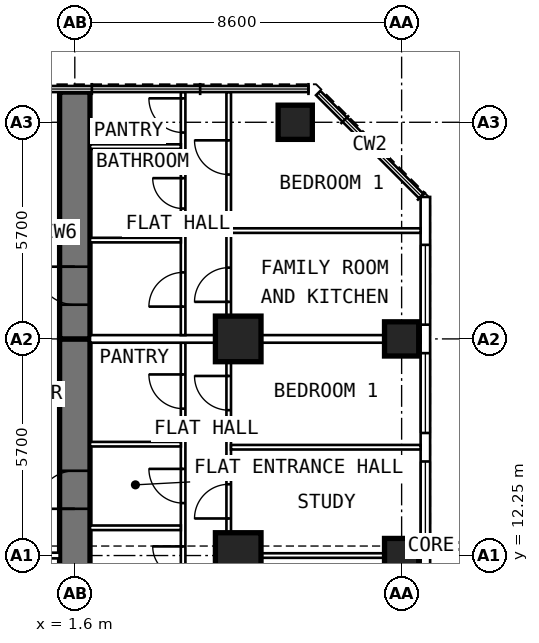
"""IFC4 building model, lengths in metres.
Left out: names, types, materials, properties, quantities, classifications, styles, units other than length and angle.
Written with IfcOpenShell. Run it as: python <this file> out.ifc"""

import sys

from ifc_helpers import new_model, si_unit, direction, frame, frame_2d, origin, origin_2d, place, context, subcontext, project, spatial, rectangle, extrude, element, fill, save


model = new_model("IFC4")
c1 = context("Model", 3, precision=1e-05, world=origin(), true_north=direction((0.0, 1.0)))
c2 = subcontext(c1, "Body", "Model", "MODEL_VIEW")
j1 = project(units=[si_unit("LENGTHUNIT", "METRE"), si_unit("PLANEANGLEUNIT", "RADIAN")], contexts=[c1])
p1 = place(None, origin())
s1 = spatial("IfcSite", under=j1, at=p1, CompositionType="ELEMENT")
p2 = place(p1, origin())
s2 = spatial("IfcBuilding", under=s1, at=p2, CompositionType="ELEMENT")
p3 = place(p2, frame((0.0, 0.0, 176.0)))
s3 = spatial("IfcBuildingStorey", under=s2, at=p3, CompositionType="ELEMENT", Elevation=176.0)
for number, where, z_axis, x_axis in (
    (1, (10.2, 12.25, 0.0), (0.0, 0.0, 1.0), (0.0, 1.0, 0.0)),
    (2, (10.2, 17.95, 0.0), (0.0, 0.0, 1.0), (0.0, 1.0, 0.0)),
    (3, (7.4, 23.65, 0.0), (0.0, 0.0, 1.0), (0.0, 1.0, 0.0)),
):
    element("IfcColumn", number, at=place(p3, frame(where, z_axis=z_axis, x_axis=x_axis)), inside=s3, PredefinedType="COLUMN", context=c2, shape_type="SweptSolid", body=[
        extrude(rectangle(XDim=0.9, YDim=0.9, at=origin_2d()), origin(), (0.0, 0.0, 1.0), 3.6),
    ])
for number, where, z_axis, x_axis in (
    (4, (5.9, 12.25, 0.0), (0.0, 0.0, 1.0), (0.0, 1.0, 0.0)),
    (5, (5.9, 17.95, 0.0), (0.0, 0.0, 1.0), (0.0, 1.0, 0.0)),
):
    element("IfcColumn", number, at=place(p3, frame(where, z_axis=z_axis, x_axis=x_axis)), inside=s3, PredefinedType="COLUMN", context=c2, shape_type="SweptSolid", body=[
        extrude(rectangle(XDim=1.2, YDim=1.2, at=origin_2d()), origin(), (0.0, 0.0, 1.0), 3.6),
    ])
p4 = place(p3, frame((1.6, 9.6, 0.0), z_axis=(0.0, 0.0, 1.0), x_axis=(0.0, 1.0, 0.0)))
e6 = element("IfcWall", 6, at=p4, inside=s3, PredefinedType="SHEAR", context=c2, shape_type="SweptSolid", body=[
    extrude(rectangle(XDim=8.35, YDim=0.8, at=frame_2d((4.175, 0.0))), origin(), (0.0, 0.0, 1.0), 3.6),
])
p5 = place(p4, frame((3.88, 0.0, 0.0)))
e7 = element("IfcOpeningElement", 7, at=p5, cuts=e6, PredefinedType="OPENING", context=c2, shape_type="SweptSolid", body=[
    extrude(rectangle(XDim=1.0, YDim=2.1, at=frame_2d((0.5, 1.05))), frame((0.0, 0.412, 0.0), z_axis=(0.0, -1.0, 0.0), x_axis=(1.0, 0.0, 0.0)), (0.0, 0.0, 1.0), 0.824),
])
p6 = place(p3, frame((1.6, 17.95, 0.0), z_axis=(0.0, 0.0, 1.0), x_axis=(0.0, 1.0, 0.0)))
e8 = element("IfcWall", 8, at=p6, inside=s3, PredefinedType="SHEAR", context=c2, shape_type="SweptSolid", body=[
    extrude(rectangle(XDim=6.495, YDim=0.8, at=frame_2d((3.248, 0.0))), origin(), (0.0, 0.0, 1.0), 3.6),
])
p7 = place(p6, frame((0.9, 0.0, 0.0)))
e9 = element("IfcOpeningElement", 9, at=p7, cuts=e8, PredefinedType="OPENING", context=c2, shape_type="SweptSolid", body=[
    extrude(rectangle(XDim=1.0, YDim=2.1, at=frame_2d((0.5, 1.05))), frame((0.0, 0.412, 0.0), z_axis=(0.0, -1.0, 0.0), x_axis=(1.0, 0.0, 0.0)), (0.0, 0.0, 1.0), 0.824),
])
p8 = place(p3, frame((10.825, 6.409, 0.0), z_axis=(0.0, 0.0, 1.0), x_axis=(0.0, 1.0, 0.0)))
e10 = element("IfcWall", 10, at=p8, inside=s3, PredefinedType="SOLIDWALL", context=c2, shape_type="SweptSolid", body=[
    extrude(rectangle(XDim=15.276, YDim=0.25, at=frame_2d((7.638, 0.0))), origin(), (0.0, 0.0, 1.0), 3.35),
])
p9 = place(p8, frame((0.516, 0.0, 0.8)))
e11 = element("IfcOpeningElement", 11, at=p9, cuts=e10, PredefinedType="OPENING", context=c2, shape_type="SweptSolid", body=[
    extrude(rectangle(XDim=2.1, YDim=1.8, at=frame_2d((1.05, 0.9))), frame((0.0, 0.137, 0.0), z_axis=(0.0, -1.0, 0.0), x_axis=(1.0, 0.0, 0.0)), (0.0, 0.0, 1.0), 0.274),
])
p10 = place(p8, frame((3.366, 0.0, 0.8)))
e12 = element("IfcOpeningElement", 12, at=p10, cuts=e10, PredefinedType="OPENING", context=c2, shape_type="SweptSolid", body=[
    extrude(rectangle(XDim=2.1, YDim=1.8, at=frame_2d((1.05, 0.9))), frame((0.0, 0.137, 0.0), z_axis=(0.0, -1.0, 0.0), x_axis=(1.0, 0.0, 0.0)), (0.0, 0.0, 1.0), 0.274),
])
p11 = place(p8, frame((6.216, 0.0, 0.8)))
e13 = element("IfcOpeningElement", 13, at=p11, cuts=e10, PredefinedType="OPENING", context=c2, shape_type="SweptSolid", body=[
    extrude(rectangle(XDim=2.1, YDim=1.8, at=frame_2d((1.05, 0.9))), frame((0.0, 0.137, 0.0), z_axis=(0.0, -1.0, 0.0), x_axis=(1.0, 0.0, 0.0)), (0.0, 0.0, 1.0), 0.274),
])
p12 = place(p8, frame((9.066, 0.0, 0.8)))
e14 = element("IfcOpeningElement", 14, at=p12, cuts=e10, PredefinedType="OPENING", context=c2, shape_type="SweptSolid", body=[
    extrude(rectangle(XDim=2.1, YDim=1.8, at=frame_2d((1.05, 0.9))), frame((0.0, 0.137, 0.0), z_axis=(0.0, -1.0, 0.0), x_axis=(1.0, 0.0, 0.0)), (0.0, 0.0, 1.0), 0.274),
])
p13 = place(p8, frame((11.916, 0.0, 0.8)))
e15 = element("IfcOpeningElement", 15, at=p13, cuts=e10, PredefinedType="OPENING", context=c2, shape_type="SweptSolid", body=[
    extrude(rectangle(XDim=2.1, YDim=1.8, at=frame_2d((1.05, 0.9))), frame((0.0, 0.137, 0.0), z_axis=(0.0, -1.0, 0.0), x_axis=(1.0, 0.0, 0.0)), (0.0, 0.0, 1.0), 0.274),
])
p14 = place(p3, frame((4.45, 10.05, 0.0), z_axis=(0.0, 0.0, 1.0), x_axis=(0.0, 1.0, 0.0)))
e16 = element("IfcWall", 16, at=p14, inside=s3, PredefinedType="PARTITIONING", context=c2, shape_type="SweptSolid", body=[
    extrude(rectangle(XDim=7.8, YDim=0.12, at=frame_2d((3.9, 0.0))), origin(), (0.0, 0.0, 1.0), 3.35),
])
p15 = place(p14, frame((1.64, 0.0, 0.0)))
e17 = element("IfcOpeningElement", 17, at=p15, cuts=e16, PredefinedType="OPENING", context=c2, shape_type="SweptSolid", body=[
    extrude(rectangle(XDim=0.8, YDim=2.1, at=frame_2d((0.4, 1.05))), frame((0.0, 0.072, 0.0), z_axis=(0.0, -1.0, 0.0), x_axis=(1.0, 0.0, 0.0)), (0.0, 0.0, 1.0), 0.144),
])
p16 = place(p14, frame((3.58, 0.0, 0.0)))
e18 = element("IfcOpeningElement", 18, at=p16, cuts=e16, PredefinedType="OPENING", context=c2, shape_type="SweptSolid", body=[
    extrude(rectangle(XDim=0.9, YDim=2.1, at=frame_2d((0.45, 1.05))), frame((0.0, 0.072, 0.0), z_axis=(0.0, -1.0, 0.0), x_axis=(1.0, 0.0, 0.0)), (0.0, 0.0, 1.0), 0.144),
])
p17 = place(p14, frame((6.065, 0.0, 0.0)))
e19 = element("IfcOpeningElement", 19, at=p17, cuts=e16, PredefinedType="OPENING", context=c2, shape_type="SweptSolid", body=[
    extrude(rectangle(XDim=0.9, YDim=2.1, at=frame_2d((0.45, 1.05))), frame((0.0, 0.072, 0.0), z_axis=(0.0, -1.0, 0.0), x_axis=(1.0, 0.0, 0.0)), (0.0, 0.0, 1.0), 0.144),
])
p18 = place(p3, frame((5.65, 9.6, 0.0), z_axis=(0.0, 0.0, 1.0), x_axis=(0.0, 1.0, 0.0)))
e20 = element("IfcWall", 20, at=p18, inside=s3, PredefinedType="PARTITIONING", context=c2, shape_type="SweptSolid", body=[
    extrude(rectangle(XDim=8.1, YDim=0.12, at=frame_2d((4.05, 0.0))), origin(), (0.0, 0.0, 1.0), 3.35),
])
p19 = place(p18, frame((1.0, 0.0, 0.0)))
e21 = element("IfcOpeningElement", 21, at=p19, cuts=e20, PredefinedType="OPENING", context=c2, shape_type="SweptSolid", body=[
    extrude(rectangle(XDim=0.9, YDim=2.1, at=frame_2d((0.45, 1.05))), frame((0.0, 0.072, 0.0), z_axis=(0.0, -1.0, 0.0), x_axis=(1.0, 0.0, 0.0)), (0.0, 0.0, 1.0), 0.144),
])
p20 = place(p18, frame((3.625, 0.0, 0.0)))
e22 = element("IfcOpeningElement", 22, at=p20, cuts=e20, PredefinedType="OPENING", context=c2, shape_type="SweptSolid", body=[
    extrude(rectangle(XDim=0.9, YDim=2.1, at=frame_2d((0.45, 1.05))), frame((0.0, 0.072, 0.0), z_axis=(0.0, -1.0, 0.0), x_axis=(1.0, 0.0, 0.0)), (0.0, 0.0, 1.0), 0.144),
])
p21 = place(p18, frame((6.475, 0.0, 0.0)))
e23 = element("IfcOpeningElement", 23, at=p21, cuts=e20, PredefinedType="OPENING", context=c2, shape_type="SweptSolid", body=[
    extrude(rectangle(XDim=0.9, YDim=2.1, at=frame_2d((0.45, 1.05))), frame((0.0, 0.072, 0.0), z_axis=(0.0, -1.0, 0.0), x_axis=(1.0, 0.0, 0.0)), (0.0, 0.0, 1.0), 0.144),
])
p22 = place(p3, frame((5.71, 12.25, 0.0), z_axis=(0.0, 0.0, 1.0), x_axis=(1.0, 0.0, 0.0)))
e24 = element("IfcWall", 24, at=p22, inside=s3, PredefinedType="PARTITIONING", context=c2, shape_type="SweptSolid", body=[
    extrude(rectangle(XDim=4.99, YDim=0.12, at=frame_2d((2.495, 0.0))), origin(), (0.0, 0.0, 1.0), 2.45),
])
p23 = place(p3, frame((5.71, 15.1, 0.0), z_axis=(0.0, 0.0, 1.0), x_axis=(1.0, 0.0, 0.0)))
e25 = element("IfcWall", 25, at=p23, inside=s3, PredefinedType="PARTITIONING", context=c2, shape_type="SweptSolid", body=[
    extrude(rectangle(XDim=4.99, YDim=0.12, at=frame_2d((2.495, 0.0))), origin(), (0.0, 0.0, 1.0), 3.35),
])
for number, where, z_axis, x_axis in (
    (26, (2.0, 12.98, 0.0), (0.0, 0.0, 1.0), (1.0, 0.0, 0.0)),
    (27, (2.0, 15.18, 0.0), (0.0, 0.0, 1.0), (1.0, 0.0, 0.0)),
):
    element("IfcWall", number, at=place(p3, frame(where, z_axis=z_axis, x_axis=x_axis)), inside=s3, PredefinedType="PARTITIONING", context=c2, shape_type="SweptSolid", body=[
        extrude(rectangle(XDim=2.39, YDim=0.12, at=frame_2d((1.195, 0.0))), origin(), (0.0, 0.0, 1.0), 3.35),
    ])
p24 = place(p3, frame((4.45, 18.05, 0.0), z_axis=(0.0, 0.0, 1.0), x_axis=(0.0, 1.0, 0.0)))
e28 = element("IfcWall", 28, at=p24, inside=s3, PredefinedType="PARTITIONING", context=c2, shape_type="SweptSolid", body=[
    extrude(rectangle(XDim=6.395, YDim=0.12, at=frame_2d((3.198, 0.0))), origin(), (0.0, 0.0, 1.0), 3.35),
])
p25 = place(p24, frame((0.75, 0.0, 0.0)))
e29 = element("IfcOpeningElement", 29, at=p25, cuts=e28, PredefinedType="OPENING", context=c2, shape_type="SweptSolid", body=[
    extrude(rectangle(XDim=0.9, YDim=2.1, at=frame_2d((0.45, 1.05))), frame((0.0, 0.072, 0.0), z_axis=(0.0, -1.0, 0.0), x_axis=(1.0, 0.0, 0.0)), (0.0, 0.0, 1.0), 0.144),
])
p26 = place(p24, frame((3.33, 0.0, 0.0)))
e30 = element("IfcOpeningElement", 30, at=p26, cuts=e28, PredefinedType="OPENING", context=c2, shape_type="SweptSolid", body=[
    extrude(rectangle(XDim=0.8, YDim=2.1, at=frame_2d((0.4, 1.05))), frame((0.0, 0.072, 0.0), z_axis=(0.0, -1.0, 0.0), x_axis=(1.0, 0.0, 0.0)), (0.0, 0.0, 1.0), 0.144),
])
p27 = place(p24, frame((5.33, 0.0, 0.0)))
e31 = element("IfcOpeningElement", 31, at=p27, cuts=e28, PredefinedType="OPENING", context=c2, shape_type="SweptSolid", body=[
    extrude(rectangle(XDim=0.9, YDim=2.1, at=frame_2d((0.45, 1.05))), frame((0.0, 0.072, 0.0), z_axis=(0.0, -1.0, 0.0), x_axis=(1.0, 0.0, 0.0)), (0.0, 0.0, 1.0), 0.144),
])
p28 = place(p3, frame((5.65, 18.05, 0.0), z_axis=(0.0, 0.0, 1.0), x_axis=(0.0, 1.0, 0.0)))
e32 = element("IfcWall", 32, at=p28, inside=s3, PredefinedType="PARTITIONING", context=c2, shape_type="SweptSolid", body=[
    extrude(rectangle(XDim=6.395, YDim=0.12, at=frame_2d((3.198, 0.0))), origin(), (0.0, 0.0, 1.0), 3.35),
])
p29 = place(p28, frame((0.875, 0.0, 0.0)))
e33 = element("IfcOpeningElement", 33, at=p29, cuts=e32, PredefinedType="OPENING", context=c2, shape_type="SweptSolid", body=[
    extrude(rectangle(XDim=0.9, YDim=2.1, at=frame_2d((0.45, 1.05))), frame((0.0, 0.072, 0.0), z_axis=(0.0, -1.0, 0.0), x_axis=(1.0, 0.0, 0.0)), (0.0, 0.0, 1.0), 0.144),
])
p30 = place(p28, frame((4.225, 0.0, 0.0)))
e34 = element("IfcOpeningElement", 34, at=p30, cuts=e32, PredefinedType="OPENING", context=c2, shape_type="SweptSolid", body=[
    extrude(rectangle(XDim=0.9, YDim=2.1, at=frame_2d((0.45, 1.05))), frame((0.0, 0.072, 0.0), z_axis=(0.0, -1.0, 0.0), x_axis=(1.0, 0.0, 0.0)), (0.0, 0.0, 1.0), 0.144),
])
p31 = place(p3, frame((5.71, 20.8, 0.0), z_axis=(0.0, 0.0, 1.0), x_axis=(1.0, 0.0, 0.0)))
e35 = element("IfcWall", 35, at=p31, inside=s3, PredefinedType="PARTITIONING", context=c2, shape_type="SweptSolid", body=[
    extrude(rectangle(XDim=4.99, YDim=0.12, at=frame_2d((2.495, 0.0))), origin(), (0.0, 0.0, 1.0), 3.35),
])
for number, where, z_axis, x_axis in (
    (36, (2.0, 20.55, 0.0), (0.0, 0.0, 1.0), (1.0, 0.0, 0.0)),
    (37, (2.0, 23.01, 0.0), (0.0, 0.0, 1.0), (1.0, 0.0, 0.0)),
):
    element("IfcWall", number, at=place(p3, frame(where, z_axis=z_axis, x_axis=x_axis)), inside=s3, PredefinedType="PARTITIONING", context=c2, shape_type="SweptSolid", body=[
        extrude(rectangle(XDim=2.39, YDim=0.12, at=frame_2d((1.195, 0.0))), origin(), (0.0, 0.0, 1.0), 3.35),
    ])
p32 = place(p3, frame((2.0, 17.95, 0.0), z_axis=(0.0, 0.0, 1.0), x_axis=(1.0, 0.0, 0.0)))
e38 = element("IfcWall", 38, at=p32, inside=s3, PredefinedType="PARTITIONING", context=c2, shape_type="SweptSolid", body=[
    extrude(rectangle(XDim=8.7, YDim=0.2, at=frame_2d((4.35, 0.0))), origin(), (0.0, 0.0, 1.0), 2.45),
])
p33 = place(p3, frame((1.2, 20.75, 0.0), z_axis=(0.0, 0.0, 1.0), x_axis=(-1.0, 0.0, 0.0)))
e39 = element("IfcWall", 39, at=p33, inside=s3, PredefinedType="PARTITIONING", context=c2, shape_type="SweptSolid", body=[
    extrude(rectangle(XDim=2.4, YDim=0.15, at=frame_2d((1.2, 0.0))), origin(), (0.0, 0.0, 1.0), 3.35),
])
p34 = place(p33, frame((0.7, 0.0, 0.0)))
e40 = element("IfcOpeningElement", 40, at=p34, cuts=e39, PredefinedType="OPENING", context=c2, shape_type="SweptSolid", body=[
    extrude(rectangle(XDim=1.0, YDim=2.1, at=frame_2d((0.5, 1.05))), frame((0.0, 0.087, 0.0), z_axis=(0.0, -1.0, 0.0), x_axis=(1.0, 0.0, 0.0)), (0.0, 0.0, 1.0), 0.174),
])
p35 = place(p3, frame((1.2, 12.25, 0.0), z_axis=(0.0, 0.0, 1.0), x_axis=(-1.0, 0.0, 0.0)))
e41 = element("IfcWall", 41, at=p35, inside=s3, PredefinedType="PARTITIONING", context=c2, shape_type="SweptSolid", body=[
    extrude(rectangle(XDim=2.4, YDim=0.15, at=frame_2d((1.2, 0.0))), origin(), (0.0, 0.0, 1.0), 3.35),
])
p36 = place(p35, frame((0.7, 0.0, 0.0)))
e42 = element("IfcOpeningElement", 42, at=p36, cuts=e41, PredefinedType="OPENING", context=c2, shape_type="SweptSolid", body=[
    extrude(rectangle(XDim=1.0, YDim=2.1, at=frame_2d((0.5, 1.05))), frame((0.0, 0.087, 0.0), z_axis=(0.0, -1.0, 0.0), x_axis=(1.0, 0.0, 0.0)), (0.0, 0.0, 1.0), 0.174),
])
p37 = place(p11, origin())
e43 = element("IfcWindow", 43, at=p37, inside=s3, PartitioningType="SINGLE_PANEL", PredefinedType="WINDOW", context=c2, shape_type="SweptSolid", body=[
    extrude(rectangle(XDim=2.1, YDim=1.8, at=frame_2d((1.05, 0.9))), frame((0.0, 0.03, 0.0), z_axis=(0.0, -1.0, 0.0), x_axis=(1.0, 0.0, 0.0)), (0.0, 0.0, 1.0), 0.06),
])
fill(e13, e43)
p38 = place(p12, origin())
e44 = element("IfcWindow", 44, at=p38, inside=s3, PartitioningType="SINGLE_PANEL", PredefinedType="WINDOW", context=c2, shape_type="SweptSolid", body=[
    extrude(rectangle(XDim=2.1, YDim=1.8, at=frame_2d((1.05, 0.9))), frame((0.0, 0.03, 0.0), z_axis=(0.0, -1.0, 0.0), x_axis=(1.0, 0.0, 0.0)), (0.0, 0.0, 1.0), 0.06),
])
fill(e14, e44)
p39 = place(p13, origin())
e45 = element("IfcWindow", 45, at=p39, inside=s3, PartitioningType="SINGLE_PANEL", PredefinedType="WINDOW", context=c2, shape_type="SweptSolid", body=[
    extrude(rectangle(XDim=2.1, YDim=1.8, at=frame_2d((1.05, 0.9))), frame((0.0, 0.03, 0.0), z_axis=(0.0, -1.0, 0.0), x_axis=(1.0, 0.0, 0.0)), (0.0, 0.0, 1.0), 0.06),
])
fill(e15, e45)
p40 = place(p5, origin())
e46 = element("IfcDoor", 46, at=p40, inside=s3, OperationType="SINGLE_SWING_LEFT", PredefinedType="DOOR", context=c2, shape_type="SweptSolid", body=[
    extrude(rectangle(XDim=1.0, YDim=2.1, at=frame_2d((0.5, 1.05))), frame((0.0, 0.15, 0.0), z_axis=(0.0, -1.0, 0.0), x_axis=(1.0, 0.0, 0.0)), (0.0, 0.0, 1.0), 0.3),
])
fill(e7, e46)
p41 = place(p20, origin())
e47 = element("IfcDoor", 47, at=p41, inside=s3, OperationType="SINGLE_SWING_LEFT", PredefinedType="DOOR", context=c2, shape_type="SweptSolid", body=[
    extrude(rectangle(XDim=0.9, YDim=2.1, at=frame_2d((0.45, 1.05))), frame((0.0, 0.025, 0.0), z_axis=(0.0, -1.0, 0.0), x_axis=(1.0, 0.0, 0.0)), (0.0, 0.0, 1.0), 0.05),
])
fill(e22, e47)
p42 = place(p21, origin())
e48 = element("IfcDoor", 48, at=p42, inside=s3, OperationType="SINGLE_SWING_RIGHT", PredefinedType="DOOR", context=c2, shape_type="SweptSolid", body=[
    extrude(rectangle(XDim=0.9, YDim=2.1, at=frame_2d((0.45, 1.05))), frame((0.0, 0.025, 0.0), z_axis=(0.0, -1.0, 0.0), x_axis=(1.0, 0.0, 0.0)), (0.0, 0.0, 1.0), 0.05),
])
fill(e23, e48)
p43 = place(p15, origin())
e49 = element("IfcDoor", 49, at=p43, inside=s3, OperationType="SINGLE_SWING_RIGHT", PredefinedType="DOOR", context=c2, shape_type="SweptSolid", body=[
    extrude(rectangle(XDim=0.8, YDim=2.1, at=frame_2d((0.4, 1.05))), frame((0.0, 0.025, 0.0), z_axis=(0.0, -1.0, 0.0), x_axis=(1.0, 0.0, 0.0)), (0.0, 0.0, 1.0), 0.05),
])
fill(e17, e49)
p44 = place(p16, origin())
e50 = element("IfcDoor", 50, at=p44, inside=s3, OperationType="SINGLE_SWING_RIGHT", PredefinedType="DOOR", context=c2, shape_type="SweptSolid", body=[
    extrude(rectangle(XDim=0.9, YDim=2.1, at=frame_2d((0.45, 1.05))), frame((0.0, 0.025, 0.0), z_axis=(0.0, -1.0, 0.0), x_axis=(1.0, 0.0, 0.0)), (0.0, 0.0, 1.0), 0.05),
])
fill(e18, e50)
p45 = place(p17, origin())
e51 = element("IfcDoor", 51, at=p45, inside=s3, OperationType="SINGLE_SWING_RIGHT", PredefinedType="DOOR", context=c2, shape_type="SweptSolid", body=[
    extrude(rectangle(XDim=0.9, YDim=2.1, at=frame_2d((0.45, 1.05))), frame((0.0, 0.025, 0.0), z_axis=(0.0, -1.0, 0.0), x_axis=(1.0, 0.0, 0.0)), (0.0, 0.0, 1.0), 0.05),
])
fill(e19, e51)
p46 = place(p7, origin())
e52 = element("IfcDoor", 52, at=p46, inside=s3, OperationType="SINGLE_SWING_RIGHT", PredefinedType="DOOR", context=c2, shape_type="SweptSolid", body=[
    extrude(rectangle(XDim=1.0, YDim=2.1, at=frame_2d((0.5, 1.05))), frame((0.0, 0.15, 0.0), z_axis=(0.0, -1.0, 0.0), x_axis=(1.0, 0.0, 0.0)), (0.0, 0.0, 1.0), 0.3),
])
fill(e9, e52)
p47 = place(p29, origin())
e53 = element("IfcDoor", 53, at=p47, inside=s3, OperationType="SINGLE_SWING_LEFT", PredefinedType="DOOR", context=c2, shape_type="SweptSolid", body=[
    extrude(rectangle(XDim=0.9, YDim=2.1, at=frame_2d((0.45, 1.05))), frame((0.0, 0.025, 0.0), z_axis=(0.0, -1.0, 0.0), x_axis=(1.0, 0.0, 0.0)), (0.0, 0.0, 1.0), 0.05),
])
fill(e33, e53)
p48 = place(p30, origin())
e54 = element("IfcDoor", 54, at=p48, inside=s3, OperationType="SINGLE_SWING_RIGHT", PredefinedType="DOOR", context=c2, shape_type="SweptSolid", body=[
    extrude(rectangle(XDim=0.9, YDim=2.1, at=frame_2d((0.45, 1.05))), frame((0.0, 0.025, 0.0), z_axis=(0.0, -1.0, 0.0), x_axis=(1.0, 0.0, 0.0)), (0.0, 0.0, 1.0), 0.05),
])
fill(e34, e54)
p49 = place(p25, origin())
e55 = element("IfcDoor", 55, at=p49, inside=s3, OperationType="SINGLE_SWING_LEFT", PredefinedType="DOOR", context=c2, shape_type="SweptSolid", body=[
    extrude(rectangle(XDim=0.9, YDim=2.1, at=frame_2d((0.45, 1.05))), frame((0.0, 0.025, 0.0), z_axis=(0.0, -1.0, 0.0), x_axis=(1.0, 0.0, 0.0)), (0.0, 0.0, 1.0), 0.05),
])
fill(e29, e55)
p50 = place(p26, origin())
e56 = element("IfcDoor", 56, at=p50, inside=s3, OperationType="SINGLE_SWING_RIGHT", PredefinedType="DOOR", context=c2, shape_type="SweptSolid", body=[
    extrude(rectangle(XDim=0.8, YDim=2.1, at=frame_2d((0.4, 1.05))), frame((0.0, 0.025, 0.0), z_axis=(0.0, -1.0, 0.0), x_axis=(1.0, 0.0, 0.0)), (0.0, 0.0, 1.0), 0.05),
])
fill(e30, e56)
p51 = place(p27, origin())
e57 = element("IfcDoor", 57, at=p51, inside=s3, OperationType="SINGLE_SWING_RIGHT", PredefinedType="DOOR", context=c2, shape_type="SweptSolid", body=[
    extrude(rectangle(XDim=0.9, YDim=2.1, at=frame_2d((0.45, 1.05))), frame((0.0, 0.025, 0.0), z_axis=(0.0, -1.0, 0.0), x_axis=(1.0, 0.0, 0.0)), (0.0, 0.0, 1.0), 0.05),
])
fill(e31, e57)
save(model, sys.argv[1])
